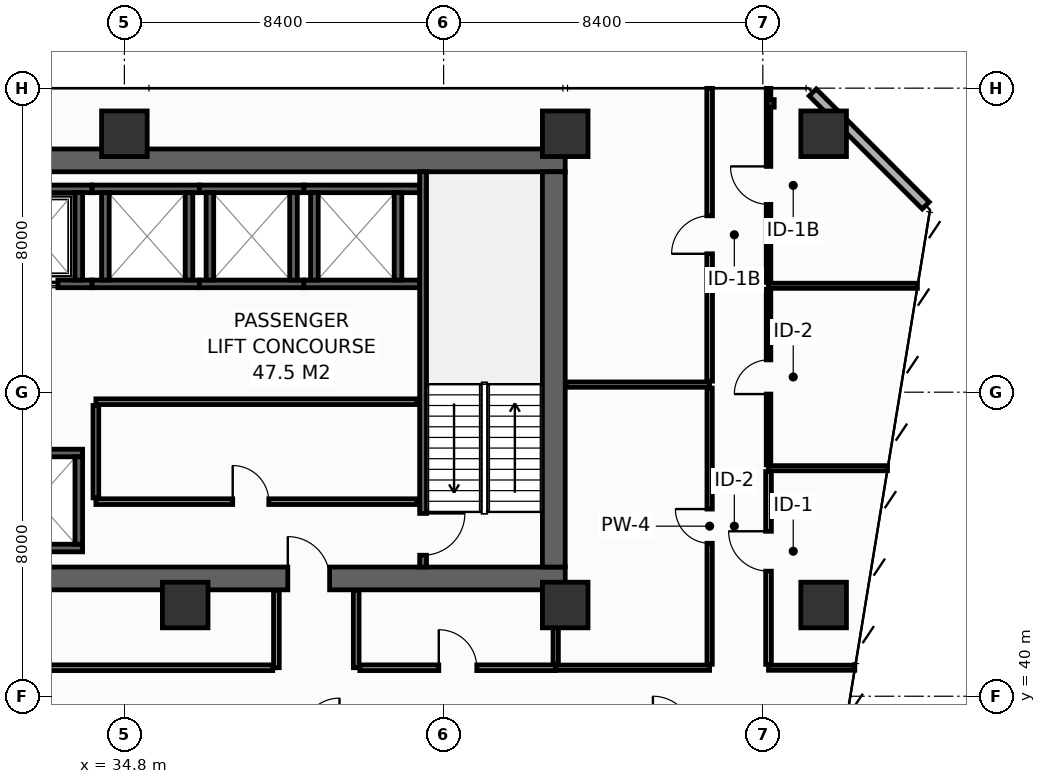
"""IFC4 building model, lengths in metres.
Left out: names, types, materials, properties, quantities, classifications, styles, units other than length and angle.
Written with IfcOpenShell. Run it as: python <this file> out.ifc"""

import sys

from ifc_helpers import new_model, si_unit, direction, frame, frame_2d, origin, origin_2d, place, context, subcontext, project, spatial, rectangle, hollow_rectangle, extrude, element, fill, save


model = new_model("IFC4")
c1 = context("Model", 3, precision=1e-05, world=origin(), true_north=direction((0.0, 1.0)))
c2 = subcontext(c1, "Body", "Model", "MODEL_VIEW")
j1 = project(units=[si_unit("LENGTHUNIT", "METRE"), si_unit("PLANEANGLEUNIT", "RADIAN")], contexts=[c1])
p1 = place(None, origin())
s1 = spatial("IfcSite", under=j1, at=p1, CompositionType="ELEMENT")
p2 = place(p1, origin())
s2 = spatial("IfcBuilding", under=s1, at=p2, CompositionType="ELEMENT")
p3 = place(p2, frame((0.0, 0.0, 78.0)))
s3 = spatial("IfcBuildingStorey", under=s2, at=p3, CompositionType="ELEMENT", Elevation=78.0)
p4 = place(p3, frame((13.5, 43.1, 0.0), z_axis=(0.0, 0.0, 1.0), x_axis=(1.0, 0.0, 0.0)))
e1 = element("IfcWall", 1, at=p4, inside=s3, PredefinedType="SHEAR", context=c2, shape_type="SweptSolid", body=[
    extrude(rectangle(XDim=32.9, YDim=0.6, at=frame_2d((16.45, 0.0))), origin(), (0.0, 0.0, 1.0), 4.15),
])
p5 = place(p4, frame((5.4, 0.0, 0.0)))
e2 = element("IfcOpeningElement", 2, at=p5, cuts=e1, PredefinedType="OPENING", context=c2, shape_type="SweptSolid", body=[
    extrude(rectangle(XDim=1.1, YDim=2.15, at=frame_2d((0.55, 1.075))), frame((0.0, 0.31, 0.0), z_axis=(0.0, -1.0, 0.0), x_axis=(1.0, 0.0, 0.0)), (0.0, 0.0, 1.0), 0.62),
])
p6 = place(p4, frame((25.6, 0.0, 0.0)))
e3 = element("IfcOpeningElement", 3, at=p6, cuts=e1, PredefinedType="OPENING", context=c2, shape_type="SweptSolid", body=[
    extrude(rectangle(XDim=1.1, YDim=2.15, at=frame_2d((0.55, 1.075))), frame((0.0, 0.31, 0.0), z_axis=(0.0, -1.0, 0.0), x_axis=(1.0, 0.0, 0.0)), (0.0, 0.0, 1.0), 0.62),
])
p7 = place(p3, frame((13.5, 54.1, 0.0), z_axis=(0.0, 0.0, 1.0), x_axis=(1.0, 0.0, 0.0)))
e4 = element("IfcWall", 4, at=p7, inside=s3, PredefinedType="SHEAR", context=c2, shape_type="SweptSolid", body=[
    extrude(rectangle(XDim=32.9, YDim=0.6, at=frame_2d((16.45, 0.0))), origin(), (0.0, 0.0, 1.0), 4.15),
])
p8 = place(p3, frame((46.1, 43.4, 0.0), z_axis=(0.0, 0.0, 1.0), x_axis=(0.0, 1.0, 0.0)))
e5 = element("IfcWall", 5, at=p8, inside=s3, PredefinedType="SHEAR", context=c2, shape_type="SweptSolid", body=[
    extrude(rectangle(XDim=10.4, YDim=0.6, at=frame_2d((5.2, 0.0))), origin(), (0.0, 0.0, 1.0), 4.15),
])
for number, where, z_axis, x_axis in (
    (6, (34.8, 54.8, 0.0), (0.0, 0.0, 1.0), (1.0, 0.0, 0.0)),
    (7, (46.4, 54.8, 0.0), (0.0, 0.0, 1.0), (1.0, 0.0, 0.0)),
    (8, (53.2, 54.8, 0.0), (0.0, 0.0, 1.0), (1.0, 0.0, 0.0)),
    (9, (36.4, 42.4, 0.0), (0.0, 0.0, 1.0), (1.0, 0.0, 0.0)),
    (10, (46.4, 42.4, 0.0), (0.0, 0.0, 1.0), (1.0, 0.0, 0.0)),
    (11, (53.2, 42.4, 0.0), (0.0, 0.0, 1.0), (1.0, 0.0, 0.0)),
):
    element("IfcColumn", number, at=place(p3, frame(where, z_axis=z_axis, x_axis=x_axis)), inside=s3, PredefinedType="COLUMN", context=c2, shape_type="SweptSolid", body=[
        extrude(hollow_rectangle(XDim=1.2, YDim=1.2, WallThickness=0.055, at=origin_2d()), origin(), (0.0, 0.0, 1.0), 4.4),
    ])
p9 = place(p3, frame((51.8, 55.6, 0.0), z_axis=(0.0, 0.0, 1.0), x_axis=(1.0, 0.0, 0.0)))
e12 = element("IfcColumn", 12, at=p9, inside=s3, PredefinedType="PILASTER", context=c2, shape_type="SweptSolid", body=[
    extrude(hollow_rectangle(XDim=0.2, YDim=0.2, WallThickness=0.01, at=origin_2d()), origin(), (0.0, 0.0, 1.0), 4.4),
])
p10 = place(p3, frame((31.125, 50.85, 0.0), z_axis=(0.0, 0.0, 1.0), x_axis=(1.0, 0.0, 0.0)))
e13 = element("IfcWall", 13, at=p10, inside=s3, PredefinedType="SHEAR", context=c2, shape_type="SweptSolid", body=[
    extrude(rectangle(XDim=2.825, YDim=0.2, at=frame_2d((1.413, 0.0))), origin(), (0.0, 0.0, 1.0), 4.15),
])
p11 = place(p10, frame((0.825, 0.0, 0.0)))
e14 = element("IfcOpeningElement", 14, at=p11, cuts=e13, PredefinedType="OPENING", context=c2, shape_type="SweptSolid", body=[
    extrude(rectangle(XDim=1.1, YDim=2.2, at=frame_2d((0.55, 1.1))), frame((0.0, 0.11, 0.0), z_axis=(0.0, -1.0, 0.0), x_axis=(1.0, 0.0, 0.0)), (0.0, 0.0, 1.0), 0.22),
])
p12 = place(p3, frame((31.125, 53.35, 0.0), z_axis=(0.0, 0.0, 1.0), x_axis=(1.0, 0.0, 0.0)))
e15 = element("IfcWall", 15, at=p12, inside=s3, PredefinedType="SHEAR", context=c2, shape_type="SweptSolid", body=[
    extrude(rectangle(XDim=2.825, YDim=0.2, at=frame_2d((1.413, 0.0))), origin(), (0.0, 0.0, 1.0), 4.15),
])
p13 = place(p3, frame((33.6, 50.95, 0.0), z_axis=(0.0, 0.0, 1.0), x_axis=(0.0, 1.0, 0.0)))
e16 = element("IfcWall", 16, at=p13, inside=s3, PredefinedType="SHEAR", context=c2, shape_type="SweptSolid", body=[
    extrude(rectangle(XDim=2.3, YDim=0.2, at=frame_2d((1.15, 0.0))), origin(), (0.0, 0.0, 1.0), 4.15),
])
for number, where, z_axis, x_axis in (
    (17, (31.125, 43.9, 0.0), (0.0, 0.0, 1.0), (1.0, 0.0, 0.0)),
    (18, (31.125, 46.4, 0.0), (0.0, 0.0, 1.0), (1.0, 0.0, 0.0)),
):
    element("IfcWall", number, at=place(p3, frame(where, z_axis=z_axis, x_axis=x_axis)), inside=s3, PredefinedType="SHEAR", context=c2, shape_type="SweptSolid", body=[
        extrude(rectangle(XDim=2.575, YDim=0.2, at=frame_2d((1.288, 0.0))), origin(), (0.0, 0.0, 1.0), 4.15),
    ])
p14 = place(p3, frame((33.6, 44.0, 0.0), z_axis=(0.0, 0.0, 1.0), x_axis=(0.0, 1.0, 0.0)))
e19 = element("IfcWall", 19, at=p14, inside=s3, PredefinedType="SHEAR", context=c2, shape_type="SweptSolid", body=[
    extrude(rectangle(XDim=2.3, YDim=0.2, at=frame_2d((1.15, 0.0))), origin(), (0.0, 0.0, 1.0), 4.15),
])
for number, where, z_axis, x_axis in (
    (20, (33.95, 50.85, 0.0), (0.0, 0.0, 1.0), (1.0, 0.0, 0.0)),
    (21, (33.95, 53.35, 0.0), (0.0, 0.0, 1.0), (1.0, 0.0, 0.0)),
):
    element("IfcWall", number, at=place(p3, frame(where, z_axis=z_axis, x_axis=x_axis)), inside=s3, PredefinedType="SHEAR", context=c2, shape_type="SweptSolid", body=[
        extrude(rectangle(XDim=2.825, YDim=0.2, at=frame_2d((1.413, 0.0))), origin(), (0.0, 0.0, 1.0), 4.15),
    ])
for number, where, z_axis, x_axis in (
    (22, (34.3, 50.95, 0.0), (0.0, 0.0, 1.0), (0.0, 1.0, 0.0)),
    (23, (36.5, 50.95, 0.0), (0.0, 0.0, 1.0), (0.0, 1.0, 0.0)),
):
    element("IfcWall", number, at=place(p3, frame(where, z_axis=z_axis, x_axis=x_axis)), inside=s3, PredefinedType="SHEAR", context=c2, shape_type="SweptSolid", body=[
        extrude(rectangle(XDim=2.3, YDim=0.2, at=frame_2d((1.15, 0.0))), origin(), (0.0, 0.0, 1.0), 4.15),
    ])
for number, where, z_axis, x_axis in (
    (24, (36.775, 50.85, 0.0), (0.0, 0.0, 1.0), (1.0, 0.0, 0.0)),
    (25, (36.775, 53.35, 0.0), (0.0, 0.0, 1.0), (1.0, 0.0, 0.0)),
):
    element("IfcWall", number, at=place(p3, frame(where, z_axis=z_axis, x_axis=x_axis)), inside=s3, PredefinedType="SHEAR", context=c2, shape_type="SweptSolid", body=[
        extrude(rectangle(XDim=2.75, YDim=0.2, at=frame_2d((1.375, 0.0))), origin(), (0.0, 0.0, 1.0), 4.15),
    ])
for number, where, z_axis, x_axis in (
    (26, (37.05, 50.95, 0.0), (0.0, 0.0, 1.0), (0.0, 1.0, 0.0)),
    (27, (39.25, 50.95, 0.0), (0.0, 0.0, 1.0), (0.0, 1.0, 0.0)),
):
    element("IfcWall", number, at=place(p3, frame(where, z_axis=z_axis, x_axis=x_axis)), inside=s3, PredefinedType="SHEAR", context=c2, shape_type="SweptSolid", body=[
        extrude(rectangle(XDim=2.3, YDim=0.2, at=frame_2d((1.15, 0.0))), origin(), (0.0, 0.0, 1.0), 4.15),
    ])
for number, where, z_axis, x_axis in (
    (28, (39.525, 50.85, 0.0), (0.0, 0.0, 1.0), (1.0, 0.0, 0.0)),
    (29, (39.525, 53.35, 0.0), (0.0, 0.0, 1.0), (1.0, 0.0, 0.0)),
):
    element("IfcWall", number, at=place(p3, frame(where, z_axis=z_axis, x_axis=x_axis)), inside=s3, PredefinedType="SHEAR", context=c2, shape_type="SweptSolid", body=[
        extrude(rectangle(XDim=3.045, YDim=0.2, at=frame_2d((1.522, 0.0))), origin(), (0.0, 0.0, 1.0), 4.15),
    ])
for number, where, z_axis, x_axis in (
    (30, (39.8, 50.95, 0.0), (0.0, 0.0, 1.0), (0.0, 1.0, 0.0)),
    (31, (42.0, 50.95, 0.0), (0.0, 0.0, 1.0), (0.0, 1.0, 0.0)),
):
    element("IfcWall", number, at=place(p3, frame(where, z_axis=z_axis, x_axis=x_axis)), inside=s3, PredefinedType="SHEAR", context=c2, shape_type="SweptSolid", body=[
        extrude(rectangle(XDim=2.3, YDim=0.2, at=frame_2d((1.15, 0.0))), origin(), (0.0, 0.0, 1.0), 4.15),
    ])
p15 = place(p3, frame((42.66, 53.8, 0.0), z_axis=(0.0, 0.0, 1.0), x_axis=(0.0, -1.0, 0.0)))
e32 = element("IfcWall", 32, at=p15, inside=s3, PredefinedType="SHEAR", context=c2, shape_type="SweptSolid", body=[
    extrude(rectangle(XDim=10.4, YDim=0.18, at=frame_2d((5.2, 0.0))), origin(), (0.0, 0.0, 1.0), 4.15),
])
p16 = place(p15, frame((8.99, 0.0, 0.0)))
e33 = element("IfcOpeningElement", 33, at=p16, cuts=e32, PredefinedType="OPENING", context=c2, shape_type="SweptSolid", body=[
    extrude(rectangle(XDim=1.1, YDim=2.15, at=frame_2d((0.55, 1.075))), frame((0.0, 0.1, 0.0), z_axis=(0.0, -1.0, 0.0), x_axis=(1.0, 0.0, 0.0)), (0.0, 0.0, 1.0), 0.2),
])
p17 = place(p3, frame((34.05, 45.12, 0.0), z_axis=(0.0, 0.0, 1.0), x_axis=(1.0, 0.0, 0.0)))
e34 = element("IfcWall", 34, at=p17, inside=s3, PredefinedType="PARTITIONING", context=c2, shape_type="SweptSolid", body=[
    extrude(rectangle(XDim=8.45, YDim=0.15, at=frame_2d((4.225, 0.0))), origin(), (0.0, 0.0, 1.0), 4.15),
])
p18 = place(p17, frame((3.6, 0.0, 0.0)))
e35 = element("IfcOpeningElement", 35, at=p18, cuts=e34, PredefinedType="OPENING", context=c2, shape_type="SweptSolid", body=[
    extrude(rectangle(XDim=0.95, YDim=2.15, at=frame_2d((0.475, 1.075))), frame((0.0, 0.085, 0.0), z_axis=(0.0, -1.0, 0.0), x_axis=(1.0, 0.0, 0.0)), (0.0, 0.0, 1.0), 0.17),
])
p19 = place(p3, frame((34.05, 47.75, 0.0), z_axis=(0.0, 0.0, 1.0), x_axis=(1.0, 0.0, 0.0)))
e36 = element("IfcWall", 36, at=p19, inside=s3, PredefinedType="PARTITIONING", context=c2, shape_type="SweptSolid", body=[
    extrude(rectangle(XDim=8.45, YDim=0.15, at=frame_2d((4.225, 0.0))), origin(), (0.0, 0.0, 1.0), 4.15),
])
p20 = place(p3, frame((34.05, 45.22, 0.0), z_axis=(0.0, 0.0, 1.0), x_axis=(0.0, 1.0, 0.0)))
e37 = element("IfcWall", 37, at=p20, inside=s3, PredefinedType="PARTITIONING", context=c2, shape_type="SweptSolid", body=[
    extrude(rectangle(XDim=2.43, YDim=0.15, at=frame_2d((1.215, 0.0))), origin(), (0.0, 0.0, 1.0), 4.15),
])
p21 = place(p3, frame((55.887, 52.913, 0.0), z_axis=(0.0, 0.0, 1.0), x_axis=(-0.707106781187, 0.707106781187, 0.0)))
e38 = element("IfcWall", 38, at=p21, inside=s3, PredefinedType="STANDARD", context=c2, shape_type="SweptSolid", body=[
    extrude(rectangle(XDim=4.206, YDim=0.26, at=frame_2d((2.103, 0.0))), origin(), (0.0, 0.0, 1.0), 4.15),
])
p22 = place(p3, frame((46.15, 40.75, 0.0), z_axis=(0.0, 0.0, 1.0), x_axis=(1.0, 0.0, 0.0)))
e39 = element("IfcWall", 39, at=p22, inside=s3, PredefinedType="PARTITIONING", context=c2, shape_type="SweptSolid", body=[
    extrude(rectangle(XDim=4.05, YDim=0.14, at=frame_2d((2.025, 0.0))), origin(), (0.0, 0.0, 1.0), 4.15),
])
p23 = place(p3, frame((46.15, 40.84, 0.0), z_axis=(0.0, 0.0, 1.0), x_axis=(0.0, 1.0, 0.0)))
e40 = element("IfcWall", 40, at=p23, inside=s3, PredefinedType="PARTITIONING", context=c2, shape_type="SweptSolid", body=[
    extrude(rectangle(XDim=1.94, YDim=0.14, at=frame_2d((0.97, 0.0))), origin(), (0.0, 0.0, 1.0), 4.15),
])
p24 = place(p3, frame((46.42, 48.2, 0.0), z_axis=(0.0, 0.0, 1.0), x_axis=(1.0, 0.0, 0.0)))
e41 = element("IfcWall", 41, at=p24, inside=s3, PredefinedType="PARTITIONING", context=c2, shape_type="SweptSolid", body=[
    extrude(rectangle(XDim=3.78, YDim=0.14, at=frame_2d((1.89, 0.0))), origin(), (0.0, 0.0, 1.0), 4.15),
])
p25 = place(p3, frame((50.2, 40.84, 0.0), z_axis=(0.0, 0.0, 1.0), x_axis=(0.0, 1.0, 0.0)))
e42 = element("IfcWall", 42, at=p25, inside=s3, PredefinedType="PARTITIONING", context=c2, shape_type="SweptSolid", body=[
    extrude(rectangle(XDim=7.27, YDim=0.14, at=frame_2d((3.635, 0.0))), origin(), (0.0, 0.0, 1.0), 3.335),
])
p26 = place(p25, frame((3.185, 0.0, 0.0)))
e43 = element("IfcOpeningElement", 43, at=p26, cuts=e42, PredefinedType="OPENING", context=c2, shape_type="SweptSolid", body=[
    extrude(rectangle(XDim=0.9, YDim=2.1, at=frame_2d((0.45, 1.05))), frame((0.0, 0.08, 0.0), z_axis=(0.0, -1.0, 0.0), x_axis=(1.0, 0.0, 0.0)), (0.0, 0.0, 1.0), 0.16),
])
p27 = place(p3, frame((50.2, 48.29, 0.0), z_axis=(0.0, 0.0, 1.0), x_axis=(0.0, 1.0, 0.0)))
e44 = element("IfcWall", 44, at=p27, inside=s3, PredefinedType="PARTITIONING", context=c2, shape_type="SweptSolid", body=[
    extrude(rectangle(XDim=7.705, YDim=0.15, at=frame_2d((3.853, 0.0))), origin(), (0.0, 0.0, 1.0), 3.435),
])
p28 = place(p27, frame((3.352, 0.0, 0.0)))
e45 = element("IfcOpeningElement", 45, at=p28, cuts=e44, PredefinedType="OPENING", context=c2, shape_type="SweptSolid", body=[
    extrude(rectangle(XDim=1.0, YDim=2.15, at=frame_2d((0.5, 1.075))), frame((0.0, 0.085, 0.0), z_axis=(0.0, -1.0, 0.0), x_axis=(1.0, 0.0, 0.0)), (0.0, 0.0, 1.0), 0.17),
])
p29 = place(p3, frame((51.75, 40.75, 0.0), z_axis=(0.0, 0.0, 1.0), x_axis=(1.0, 0.0, 0.0)))
e46 = element("IfcWall", 46, at=p29, inside=s3, PredefinedType="PARTITIONING", context=c2, shape_type="SweptSolid", body=[
    extrude(rectangle(XDim=2.271, YDim=0.135, at=frame_2d((1.135, 0.0))), origin(), (0.0, 0.0, 1.0), 3.635),
])
p30 = place(p3, frame((51.75, 46.0, 0.0), z_axis=(0.0, 0.0, 1.0), x_axis=(1.0, 0.0, 0.0)))
e47 = element("IfcWall", 47, at=p30, inside=s3, PredefinedType="PARTITIONING", context=c2, shape_type="SweptSolid", body=[
    extrude(rectangle(XDim=3.131, YDim=0.135, at=frame_2d((1.565, 0.0))), origin(), (0.0, 0.0, 1.0), 3.335),
])
p31 = place(p3, frame((51.75, 50.8, 0.0), z_axis=(0.0, 0.0, 1.0), x_axis=(1.0, 0.0, 0.0)))
e48 = element("IfcWall", 48, at=p31, inside=s3, PredefinedType="PARTITIONING", context=c2, shape_type="SweptSolid", body=[
    extrude(rectangle(XDim=3.917, YDim=0.135, at=frame_2d((1.958, 0.0))), origin(), (0.0, 0.0, 1.0), 3.335),
])
p32 = place(p3, frame((51.75, 40.837, 0.0), z_axis=(0.0, 0.0, 1.0), x_axis=(0.0, 1.0, 0.0)))
e49 = element("IfcWall", 49, at=p32, inside=s3, PredefinedType="PARTITIONING", context=c2, shape_type="SweptSolid", body=[
    extrude(rectangle(XDim=5.075, YDim=0.15, at=frame_2d((2.538, 0.0))), origin(), (0.0, 0.0, 1.0), 3.335),
])
p33 = place(p32, frame((2.453, 0.0, 0.0)))
e50 = element("IfcOpeningElement", 50, at=p33, cuts=e49, PredefinedType="OPENING", context=c2, shape_type="SweptSolid", body=[
    extrude(rectangle(XDim=1.05, YDim=2.15, at=frame_2d((0.525, 1.075))), frame((0.0, 0.085, 0.0), z_axis=(0.0, -1.0, 0.0), x_axis=(1.0, 0.0, 0.0)), (0.0, 0.0, 1.0), 0.17),
])
p34 = place(p3, frame((51.75, 46.087, 0.0), z_axis=(0.0, 0.0, 1.0), x_axis=(0.0, 1.0, 0.0)))
e51 = element("IfcWall", 51, at=p34, inside=s3, PredefinedType="PARTITIONING", context=c2, shape_type="SweptSolid", body=[
    extrude(rectangle(XDim=4.625, YDim=0.12, at=frame_2d((2.312, 0.0))), origin(), (0.0, 0.0, 1.0), 4.15),
])
p35 = place(p34, frame((1.863, 0.0, 0.0)))
e52 = element("IfcOpeningElement", 52, at=p35, cuts=e51, PredefinedType="OPENING", context=c2, shape_type="SweptSolid", body=[
    extrude(rectangle(XDim=0.9, YDim=2.1, at=frame_2d((0.45, 1.05))), frame((0.0, 0.07, 0.0), z_axis=(0.0, -1.0, 0.0), x_axis=(1.0, 0.0, 0.0)), (0.0, 0.0, 1.0), 0.14),
])
p36 = place(p3, frame((51.75, 50.887, 0.0), z_axis=(0.0, 0.0, 1.0), x_axis=(0.0, 1.0, 0.0)))
e53 = element("IfcWall", 53, at=p36, inside=s3, PredefinedType="PARTITIONING", context=c2, shape_type="SweptSolid", body=[
    extrude(rectangle(XDim=5.108, YDim=0.12, at=frame_2d((2.554, 0.0))), origin(), (0.0, 0.0, 1.0), 3.435),
])
p37 = place(p36, frame((2.054, 0.0, 0.0)))
e54 = element("IfcOpeningElement", 54, at=p37, cuts=e53, PredefinedType="OPENING", context=c2, shape_type="SweptSolid", body=[
    extrude(rectangle(XDim=1.0, YDim=2.15, at=frame_2d((0.5, 1.075))), frame((0.0, 0.07, 0.0), z_axis=(0.0, -1.0, 0.0), x_axis=(1.0, 0.0, 0.0)), (0.0, 0.0, 1.0), 0.14),
])
for number, where, z_axis, x_axis in (
    (55, (38.8, 40.75, 0.0), (0.0, 0.0, 1.0), (0.0, 1.0, 0.0)),
    (56, (40.9, 40.75, 0.0), (0.0, 0.0, 1.0), (0.0, 1.0, 0.0)),
):
    element("IfcWall", number, at=place(p3, frame(where, z_axis=z_axis, x_axis=x_axis)), inside=s3, PredefinedType="PARTITIONING", context=c2, shape_type="SweptSolid", body=[
        extrude(rectangle(XDim=2.03, YDim=0.15, at=frame_2d((1.015, 0.0))), origin(), (0.0, 0.0, 1.0), 4.15),
    ])
p38 = place(p3, frame((20.795, 40.75, 0.0), z_axis=(0.0, 0.0, 1.0), x_axis=(1.0, 0.0, 0.0)))
e57 = element("IfcWall", 57, at=p38, inside=s3, PredefinedType="PARTITIONING", context=c2, shape_type="SweptSolid", body=[
    extrude(rectangle(XDim=17.91, YDim=0.15, at=frame_2d((8.955, 0.0))), origin(), (0.0, 0.0, 1.0), 3.335),
])
p39 = place(p38, frame((8.455, 0.0, 0.0)))
e58 = element("IfcOpeningElement", 58, at=p39, cuts=e57, PredefinedType="OPENING", context=c2, shape_type="SweptSolid", body=[
    extrude(rectangle(XDim=1.0, YDim=2.15, at=frame_2d((0.5, 1.075))), frame((0.0, 0.085, 0.0), z_axis=(0.0, -1.0, 0.0), x_axis=(1.0, 0.0, 0.0)), (0.0, 0.0, 1.0), 0.17),
])
p40 = place(p3, frame((40.995, 40.75, 0.0), z_axis=(0.0, 0.0, 1.0), x_axis=(1.0, 0.0, 0.0)))
e59 = element("IfcWall", 59, at=p40, inside=s3, PredefinedType="PARTITIONING", context=c2, shape_type="SweptSolid", body=[
    extrude(rectangle(XDim=5.155, YDim=0.15, at=frame_2d((2.577, 0.0))), origin(), (0.0, 0.0, 1.0), 4.15),
])
p41 = place(p40, frame((2.078, 0.0, 0.0)))
e60 = element("IfcOpeningElement", 60, at=p41, cuts=e59, PredefinedType="OPENING", context=c2, shape_type="SweptSolid", body=[
    extrude(rectangle(XDim=1.0, YDim=2.15, at=frame_2d((0.5, 1.075))), frame((0.0, 0.085, 0.0), z_axis=(0.0, -1.0, 0.0), x_axis=(1.0, 0.0, 0.0)), (0.0, 0.0, 1.0), 0.17),
])
p42 = place(p11, origin())
e61 = element("IfcDoor", 61, at=p42, inside=s3, OperationType="SLIDING_TO_LEFT", PredefinedType="DOOR", context=c2, shape_type="SweptSolid", body=[
    extrude(rectangle(XDim=1.1, YDim=2.2, at=frame_2d((0.55, 1.1))), frame((0.0, 0.025, 0.0), z_axis=(0.0, -1.0, 0.0), x_axis=(1.0, 0.0, 0.0)), (0.0, 0.0, 1.0), 0.05),
])
fill(e14, e61)
p43 = place(p16, origin())
e62 = element("IfcDoor", 62, at=p43, inside=s3, OperationType="SINGLE_SWING_LEFT", PredefinedType="DOOR", context=c2, shape_type="SweptSolid", body=[
    extrude(rectangle(XDim=1.1, YDim=2.15, at=frame_2d((0.55, 1.075))), frame((0.0, 0.025, 0.0), z_axis=(0.0, -1.0, 0.0), x_axis=(1.0, 0.0, 0.0)), (0.0, 0.0, 1.0), 0.05),
])
fill(e33, e62)
p44 = place(p6, origin())
e63 = element("IfcDoor", 63, at=p44, inside=s3, OperationType="SINGLE_SWING_LEFT", PredefinedType="DOOR", context=c2, shape_type="SweptSolid", body=[
    extrude(rectangle(XDim=1.1, YDim=2.15, at=frame_2d((0.55, 1.075))), frame((0.0, 0.025, 0.0), z_axis=(0.0, -1.0, 0.0), x_axis=(1.0, 0.0, 0.0)), (0.0, 0.0, 1.0), 0.05),
])
fill(e3, e63)
p45 = place(p18, origin())
e64 = element("IfcDoor", 64, at=p45, inside=s3, OperationType="SINGLE_SWING_LEFT", PredefinedType="DOOR", context=c2, shape_type="SweptSolid", body=[
    extrude(rectangle(XDim=0.95, YDim=2.15, at=frame_2d((0.475, 1.075))), frame((0.0, 0.025, 0.0), z_axis=(0.0, -1.0, 0.0), x_axis=(1.0, 0.0, 0.0)), (0.0, 0.0, 1.0), 0.05),
])
fill(e35, e64)
p46 = place(p26, origin())
e65 = element("IfcDoor", 65, at=p46, inside=s3, OperationType="SINGLE_SWING_RIGHT", PredefinedType="DOOR", context=c2, shape_type="SweptSolid", body=[
    extrude(rectangle(XDim=0.9, YDim=2.1, at=frame_2d((0.45, 1.05))), frame((0.0, 0.025, 0.0), z_axis=(0.0, -1.0, 0.0), x_axis=(1.0, 0.0, 0.0)), (0.0, 0.0, 1.0), 0.05),
])
fill(e43, e65)
p47 = place(p28, origin())
e66 = element("IfcDoor", 66, at=p47, inside=s3, OperationType="SINGLE_SWING_LEFT", PredefinedType="DOOR", context=c2, shape_type="SweptSolid", body=[
    extrude(rectangle(XDim=1.0, YDim=2.15, at=frame_2d((0.5, 1.075))), frame((0.0, 0.025, 0.0), z_axis=(0.0, -1.0, 0.0), x_axis=(1.0, 0.0, 0.0)), (0.0, 0.0, 1.0), 0.05),
])
fill(e45, e66)
p48 = place(p33, origin())
e67 = element("IfcDoor", 67, at=p48, inside=s3, OperationType="SINGLE_SWING_RIGHT", PredefinedType="DOOR", context=c2, shape_type="SweptSolid", body=[
    extrude(rectangle(XDim=1.05, YDim=2.15, at=frame_2d((0.525, 1.075))), frame((0.0, 0.025, 0.0), z_axis=(0.0, -1.0, 0.0), x_axis=(1.0, 0.0, 0.0)), (0.0, 0.0, 1.0), 0.05),
])
fill(e50, e67)
p49 = place(p35, origin())
e68 = element("IfcDoor", 68, at=p49, inside=s3, OperationType="SINGLE_SWING_LEFT", PredefinedType="DOOR", context=c2, shape_type="SweptSolid", body=[
    extrude(rectangle(XDim=0.9, YDim=2.1, at=frame_2d((0.45, 1.05))), frame((0.0, 0.025, 0.0), z_axis=(0.0, -1.0, 0.0), x_axis=(1.0, 0.0, 0.0)), (0.0, 0.0, 1.0), 0.05),
])
fill(e52, e68)
p50 = place(p37, origin())
e69 = element("IfcDoor", 69, at=p50, inside=s3, OperationType="SINGLE_SWING_RIGHT", PredefinedType="DOOR", context=c2, shape_type="SweptSolid", body=[
    extrude(rectangle(XDim=1.0, YDim=2.15, at=frame_2d((0.5, 1.075))), frame((0.0, 0.025, 0.0), z_axis=(0.0, -1.0, 0.0), x_axis=(1.0, 0.0, 0.0)), (0.0, 0.0, 1.0), 0.05),
])
fill(e54, e69)
p51 = place(p41, origin())
e70 = element("IfcDoor", 70, at=p51, inside=s3, OperationType="SINGLE_SWING_LEFT", PredefinedType="DOOR", context=c2, shape_type="SweptSolid", body=[
    extrude(rectangle(XDim=1.0, YDim=2.15, at=frame_2d((0.5, 1.075))), frame((0.0, 0.025, 0.0), z_axis=(0.0, -1.0, 0.0), x_axis=(1.0, 0.0, 0.0)), (0.0, 0.0, 1.0), 0.05),
])
fill(e60, e70)
save(model, sys.argv[1])
